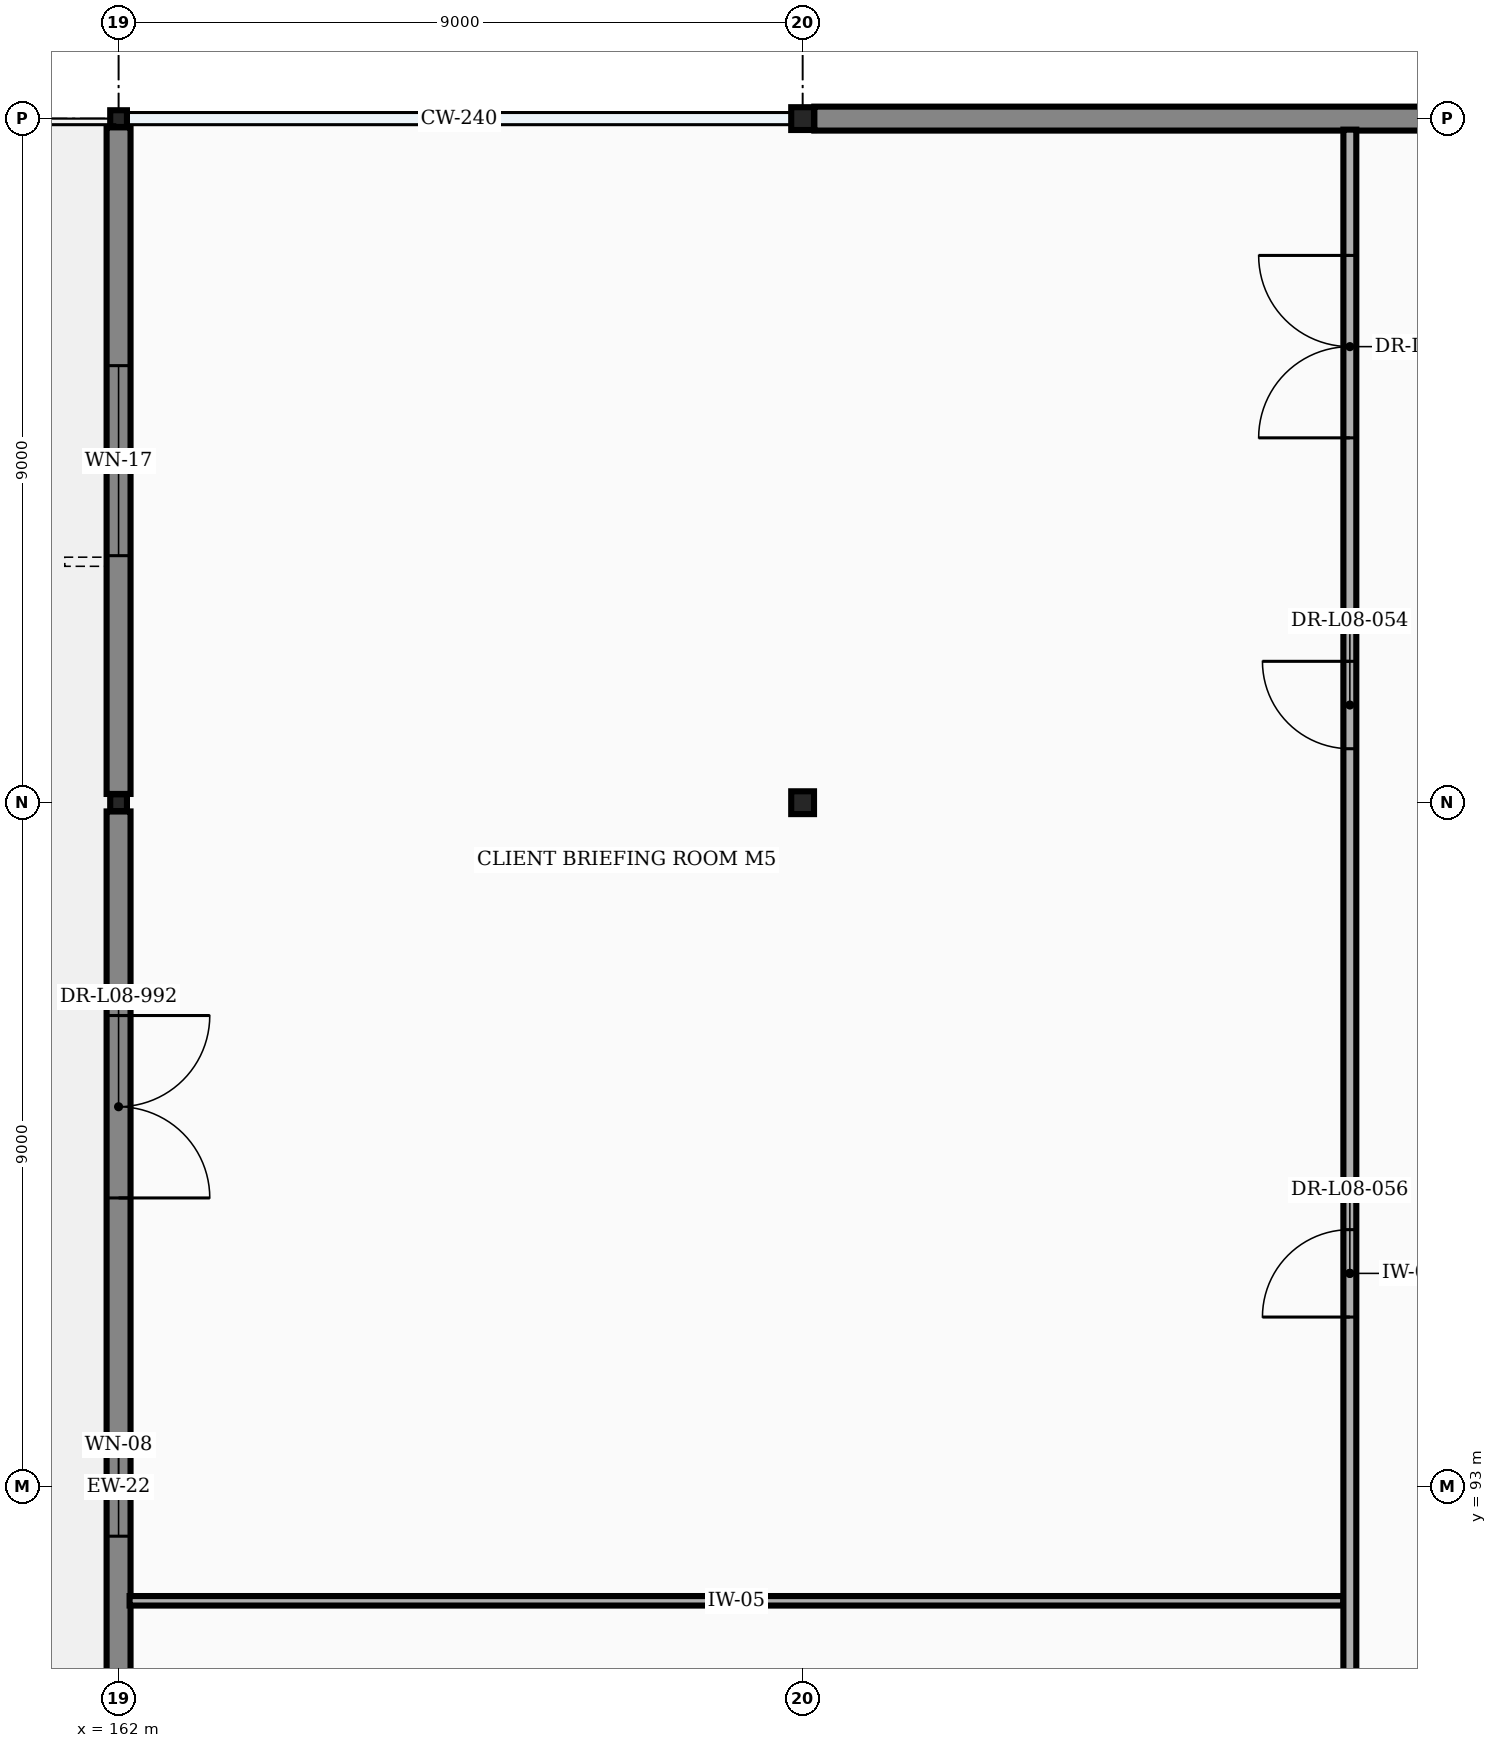
"""IFC4 building model, lengths in metres.
Left out: names, types, materials, properties, quantities, classifications, styles, units other than length and angle.
Written with IfcOpenShell. Run it as: python <this file> out.ifc"""

import sys

from ifc_helpers import new_model, si_unit, direction, frame, frame_2d, origin, origin_2d, place, context, subcontext, project, spatial, rectangle, hollow_rectangle, extrude, element, fill, save


model = new_model("IFC4")
c1 = context("Model", 3, precision=1e-05, world=origin(), true_north=direction((0.0, 1.0)))
c2 = subcontext(c1, "Body", "Model", "MODEL_VIEW")
j1 = project(units=[si_unit("LENGTHUNIT", "METRE"), si_unit("PLANEANGLEUNIT", "RADIAN")], contexts=[c1])
p1 = place(None, origin())
s1 = spatial("IfcSite", under=j1, at=p1, CompositionType="ELEMENT")
p2 = place(p1, origin())
s2 = spatial("IfcBuilding", under=s1, at=p2, CompositionType="ELEMENT")
p3 = place(p2, frame((0.0, 0.0, 37.8)))
s3 = spatial("IfcBuildingStorey", under=s2, at=p3, CompositionType="ELEMENT", Elevation=37.8)
for number, where, z_axis, x_axis in (
    (1, (162.0, 102.0, 0.0), (0.0, 0.0, 1.0), (1.0, 0.0, 0.0)),
    (2, (162.0, 111.0, 0.0), (0.0, 0.0, 1.0), (1.0, 0.0, 0.0)),
):
    element("IfcColumn", number, at=place(p3, frame(where, z_axis=z_axis, x_axis=x_axis)), inside=s3, PredefinedType="COLUMN", context=c2, shape_type="SweptSolid", body=[
        extrude(hollow_rectangle(XDim=0.22, YDim=0.22, WallThickness=0.01, at=origin_2d()), origin(), (0.0, 0.0, 1.0), 3.9),
    ])
for number, where, z_axis, x_axis in (
    (3, (171.0, 102.0, 0.0), (0.0, 0.0, 1.0), (1.0, 0.0, 0.0)),
    (4, (171.0, 111.0, 0.0), (0.0, 0.0, 1.0), (1.0, 0.0, 0.0)),
):
    element("IfcColumn", number, at=place(p3, frame(where, z_axis=z_axis, x_axis=x_axis)), inside=s3, PredefinedType="COLUMN", context=c2, shape_type="SweptSolid", body=[
        extrude(hollow_rectangle(XDim=0.3, YDim=0.3, WallThickness=0.012, at=origin_2d()), origin(), (0.0, 0.0, 1.0), 3.9),
    ])
p4 = place(p3, frame((171.154, 111.0, 0.0), z_axis=(0.0, 0.0, 1.0), x_axis=(1.0, 0.0, 0.0)))
e5 = element("IfcWall", 5, at=p4, inside=s3, PredefinedType="STANDARD", context=c2, shape_type="SweptSolid", body=[
    extrude(rectangle(XDim=17.692, YDim=0.315, at=frame_2d((8.846, 0.0))), origin(), (0.0, 0.0, 1.0), 2.803),
])
p5 = place(p4, frame((8.196, 0.0, 0.7)))
e6 = element("IfcOpeningElement", 6, at=p5, cuts=e5, PredefinedType="OPENING", context=c2, shape_type="SweptSolid", body=[
    extrude(rectangle(XDim=1.3, YDim=1.9, at=frame_2d((0.65, 0.95))), frame((0.0, 0.169, 0.0), z_axis=(0.0, -1.0, 0.0), x_axis=(1.0, 0.0, 0.0)), (0.0, 0.0, 1.0), 0.339),
])
p6 = place(p3, frame((162.0, 84.115, 0.0), z_axis=(0.0, 0.0, 1.0), x_axis=(0.0, 1.0, 0.0)))
e7 = element("IfcWall", 7, at=p6, inside=s3, PredefinedType="STANDARD", context=c2, shape_type="SweptSolid", body=[
    extrude(rectangle(XDim=17.77, YDim=0.315, at=frame_2d((8.885, 0.0))), origin(), (0.0, 0.0, 1.0), 2.953),
])
p7 = place(p6, frame((8.235, 0.0, 0.7)))
e8 = element("IfcOpeningElement", 8, at=p7, cuts=e7, PredefinedType="OPENING", context=c2, shape_type="SweptSolid", body=[
    extrude(rectangle(XDim=1.3, YDim=1.9, at=frame_2d((0.65, 0.95))), frame((0.0, 0.169, 0.0), z_axis=(0.0, -1.0, 0.0), x_axis=(1.0, 0.0, 0.0)), (0.0, 0.0, 1.0), 0.339),
])
p8 = place(p6, frame((12.685, 0.0, 0.0)))
e9 = element("IfcOpeningElement", 9, at=p8, cuts=e7, PredefinedType="OPENING", context=c2, shape_type="SweptSolid", body=[
    extrude(rectangle(XDim=2.4, YDim=2.35, at=frame_2d((1.2, 1.175))), frame((0.0, 0.169, 0.0), z_axis=(0.0, -1.0, 0.0), x_axis=(1.0, 0.0, 0.0)), (0.0, 0.0, 1.0), 0.339),
])
p9 = place(p3, frame((162.0, 102.115, 0.0), z_axis=(0.0, 0.0, 1.0), x_axis=(0.0, 1.0, 0.0)))
e10 = element("IfcWall", 10, at=p9, inside=s3, PredefinedType="STANDARD", context=c2, shape_type="SweptSolid", body=[
    extrude(rectangle(XDim=8.77, YDim=0.315, at=frame_2d((4.385, 0.0))), origin(), (0.0, 0.0, 1.0), 3.565),
])
p10 = place(p9, frame((3.135, 0.0, 0.7)))
e11 = element("IfcOpeningElement", 11, at=p10, cuts=e10, PredefinedType="OPENING", context=c2, shape_type="SweptSolid", body=[
    extrude(rectangle(XDim=2.5, YDim=1.9, at=frame_2d((1.25, 0.95))), frame((0.0, 0.169, 0.0), z_axis=(0.0, -1.0, 0.0), x_axis=(1.0, 0.0, 0.0)), (0.0, 0.0, 1.0), 0.339),
])
p11 = place(p3, frame((162.145, 91.5, 0.0), z_axis=(0.0, 0.0, 1.0), x_axis=(1.0, 0.0, 0.0)))
e12 = element("IfcWall", 12, at=p11, inside=s3, PredefinedType="PARTITIONING", context=c2, shape_type="SweptSolid", body=[
    extrude(rectangle(XDim=15.97, YDim=0.125, at=frame_2d((7.985, 0.0))), origin(), (0.0, 0.0, 1.0), 3.565),
])
p12 = place(p3, frame((178.2, 80.76, 0.0), z_axis=(0.0, 0.0, 1.0), x_axis=(0.0, 1.0, 0.0)))
e13 = element("IfcWall", 13, at=p12, inside=s3, PredefinedType="PARTITIONING", context=c2, shape_type="SweptSolid", body=[
    extrude(rectangle(XDim=30.095, YDim=0.17, at=frame_2d((15.047, 0.0))), origin(), (0.0, 0.0, 1.0), 3.565),
])
p13 = place(p12, frame((0.35, 0.0, 0.0)))
e14 = element("IfcOpeningElement", 14, at=p13, cuts=e13, PredefinedType="OPENING", context=c2, shape_type="SweptSolid", body=[
    extrude(rectangle(XDim=1.0, YDim=2.15, at=frame_2d((0.5, 1.075))), frame((0.0, 0.097, 0.0), z_axis=(0.0, -1.0, 0.0), x_axis=(1.0, 0.0, 0.0)), (0.0, 0.0, 1.0), 0.194),
])
p14 = place(p12, frame((21.95, 0.0, 0.0)))
e15 = element("IfcOpeningElement", 15, at=p14, cuts=e13, PredefinedType="OPENING", context=c2, shape_type="SweptSolid", body=[
    extrude(rectangle(XDim=1.15, YDim=2.15, at=frame_2d((0.575, 1.075))), frame((0.0, 0.097, 0.0), z_axis=(0.0, -1.0, 0.0), x_axis=(1.0, 0.0, 0.0)), (0.0, 0.0, 1.0), 0.194),
])
p15 = place(p12, frame((26.04, 0.0, 0.0)))
e16 = element("IfcOpeningElement", 16, at=p15, cuts=e13, PredefinedType="OPENING", context=c2, shape_type="SweptSolid", body=[
    extrude(rectangle(XDim=2.4, YDim=2.35, at=frame_2d((1.2, 1.175))), frame((0.0, 0.097, 0.0), z_axis=(0.0, -1.0, 0.0), x_axis=(1.0, 0.0, 0.0)), (0.0, 0.0, 1.0), 0.194),
])
p16 = place(p12, frame((14.473, 0.0, 0.0)))
e17 = element("IfcOpeningElement", 17, at=p16, cuts=e13, PredefinedType="OPENING", context=c2, shape_type="SweptSolid", body=[
    extrude(rectangle(XDim=1.15, YDim=2.15, at=frame_2d((0.575, 1.075))), frame((0.0, 0.097, 0.0), z_axis=(0.0, -1.0, 0.0), x_axis=(1.0, 0.0, 0.0)), (0.0, 0.0, 1.0), 0.194),
])
p17 = place(p7, origin())
e18 = element("IfcWindow", 18, at=p17, inside=s3, PartitioningType="SINGLE_PANEL", PredefinedType="WINDOW", context=c2, shape_type="SweptSolid", body=[
    extrude(rectangle(XDim=1.3, YDim=1.9, at=frame_2d((0.65, 0.95))), frame((0.0, 0.03, 0.0), z_axis=(0.0, -1.0, 0.0), x_axis=(1.0, 0.0, 0.0)), (0.0, 0.0, 1.0), 0.06),
])
fill(e8, e18)
p18 = place(p10, origin())
e19 = element("IfcWindow", 19, at=p18, inside=s3, PartitioningType="SINGLE_PANEL", PredefinedType="WINDOW", context=c2, shape_type="SweptSolid", body=[
    extrude(rectangle(XDim=2.5, YDim=1.9, at=frame_2d((1.25, 0.95))), frame((0.0, 0.03, 0.0), z_axis=(0.0, -1.0, 0.0), x_axis=(1.0, 0.0, 0.0)), (0.0, 0.0, 1.0), 0.06),
])
fill(e11, e19)
p19 = place(p8, frame((2.4, 0.0, 0.0), z_axis=(0.0, 0.0, 1.0), x_axis=(-1.0, 0.0, 0.0)))
e20 = element("IfcDoor", 20, at=p19, inside=s3, OperationType="DOUBLE_DOOR_SINGLE_SWING", PredefinedType="DOOR", context=c2, shape_type="SweptSolid", body=[
    extrude(rectangle(XDim=2.4, YDim=2.35, at=frame_2d((1.2, 1.175))), frame((0.0, 0.025, 0.0), z_axis=(0.0, -1.0, 0.0), x_axis=(1.0, 0.0, 0.0)), (0.0, 0.0, 1.0), 0.05),
])
fill(e9, e20)
p20 = place(p14, origin())
e21 = element("IfcDoor", 21, at=p20, inside=s3, OperationType="SINGLE_SWING_RIGHT", PredefinedType="DOOR", context=c2, shape_type="SweptSolid", body=[
    extrude(rectangle(XDim=1.15, YDim=2.15, at=frame_2d((0.575, 1.075))), frame((0.0, 0.025, 0.0), z_axis=(0.0, -1.0, 0.0), x_axis=(1.0, 0.0, 0.0)), (0.0, 0.0, 1.0), 0.05),
])
fill(e15, e21)
p21 = place(p15, origin())
e22 = element("IfcDoor", 22, at=p21, inside=s3, OperationType="DOUBLE_DOOR_SINGLE_SWING", PredefinedType="DOOR", context=c2, shape_type="SweptSolid", body=[
    extrude(rectangle(XDim=2.4, YDim=2.35, at=frame_2d((1.2, 1.175))), frame((0.0, 0.025, 0.0), z_axis=(0.0, -1.0, 0.0), x_axis=(1.0, 0.0, 0.0)), (0.0, 0.0, 1.0), 0.05),
])
fill(e16, e22)
p22 = place(p16, origin())
e23 = element("IfcDoor", 23, at=p22, inside=s3, OperationType="SINGLE_SWING_LEFT", PredefinedType="DOOR", context=c2, shape_type="SweptSolid", body=[
    extrude(rectangle(XDim=1.15, YDim=2.15, at=frame_2d((0.575, 1.075))), frame((0.0, 0.025, 0.0), z_axis=(0.0, -1.0, 0.0), x_axis=(1.0, 0.0, 0.0)), (0.0, 0.0, 1.0), 0.05),
])
fill(e17, e23)
save(model, sys.argv[1])
